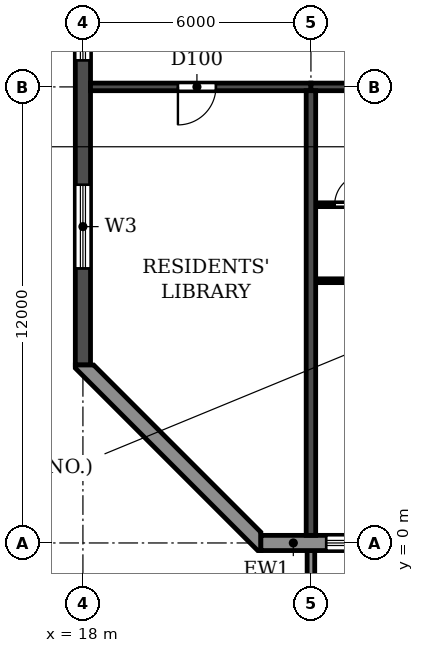
"""IFC4 building model, lengths in metres.
Left out: names, types, materials, properties, quantities, classifications, styles, units other than length and angle.
Written with IfcOpenShell. Run it as: python <this file> out.ifc"""

import sys

from ifc_helpers import new_model, si_unit, direction, frame, frame_2d, origin, place, context, subcontext, project, spatial, polyline, rectangle, outline, extrude, source, transform, mapped, element, fill, save


model = new_model("IFC4")
c1 = context("Model", 3, precision=1e-05, world=origin(), true_north=direction((0.0, 1.0)))
c2 = subcontext(c1, "Body", "Model", "MODEL_VIEW")
j1 = project(units=[si_unit("LENGTHUNIT", "METRE"), si_unit("PLANEANGLEUNIT", "RADIAN")], contexts=[c1])
p1 = place(None, origin())
s1 = spatial("IfcSite", under=j1, at=p1, CompositionType="ELEMENT")
p2 = place(p1, origin())
s2 = spatial("IfcBuilding", under=s1, at=p2, CompositionType="ELEMENT")
p3 = place(p2, frame((0.0, 0.0, 191.7)))
s3 = spatial("IfcBuildingStorey", under=s2, at=p3, CompositionType="ELEMENT", Elevation=191.7)
p4 = place(p3, frame((24.0, 0.2, 0.0), z_axis=(0.0, 0.0, 1.0), x_axis=(0.0, 1.0, 0.0)))
e1 = element("IfcWall", 1, at=p4, inside=s3, PredefinedType="SHEAR", context=c2, shape_type="SweptSolid", body=[
    extrude(rectangle(XDim=11.7, YDim=0.25, at=frame_2d((5.85, 0.0))), origin(), (0.0, 0.0, 1.0), 3.08),
])
p5 = place(p3, frame((18.0, 4.683, 0.0), z_axis=(0.0, 0.0, 1.0), x_axis=(0.0, 1.0, 0.0)))
e2 = element("IfcWall", 2, at=p5, inside=s3, PredefinedType="SHEAR", context=c2, shape_type="SweptSolid", body=[
    extrude(rectangle(XDim=31.834, YDim=0.4, at=frame_2d((15.917, 0.0))), origin(), (0.0, 0.0, 1.0), 3.08),
])
p6 = place(p5, frame((23.817, 0.0, 0.9)))
e3 = element("IfcOpeningElement", 3, at=p6, cuts=e2, PredefinedType="OPENING", context=c2, shape_type="SweptSolid", body=[
    extrude(rectangle(XDim=1.2, YDim=1.5, at=frame_2d((0.6, 0.75))), frame((0.0, 0.21, 0.0), z_axis=(0.0, -1.0, 0.0), x_axis=(1.0, 0.0, 0.0)), (0.0, 0.0, 1.0), 0.42),
])
p7 = place(p5, frame((8.017, 0.0, 0.9)))
e4 = element("IfcOpeningElement", 4, at=p7, cuts=e2, PredefinedType="OPENING", context=c2, shape_type="SweptSolid", body=[
    extrude(rectangle(XDim=1.2, YDim=1.5, at=frame_2d((0.6, 0.75))), frame((0.0, 0.21, 0.0), z_axis=(0.0, -1.0, 0.0), x_axis=(1.0, 0.0, 0.0)), (0.0, 0.0, 1.0), 0.42),
])
p8 = place(p5, frame((27.694, 0.0, 0.6)))
e5 = element("IfcOpeningElement", 5, at=p8, cuts=e2, PredefinedType="OPENING", context=c2, shape_type="SweptSolid", body=[
    extrude(rectangle(XDim=2.2, YDim=1.8, at=frame_2d((1.1, 0.9))), frame((0.0, 0.21, 0.0), z_axis=(0.0, -1.0, 0.0), x_axis=(1.0, 0.0, 0.0)), (0.0, 0.0, 1.0), 0.42),
])
p9 = place(p5, frame((2.541, 0.0, 0.6)))
e6 = element("IfcOpeningElement", 6, at=p9, cuts=e2, PredefinedType="OPENING", context=c2, shape_type="SweptSolid", body=[
    extrude(rectangle(XDim=2.2, YDim=1.8, at=frame_2d((1.1, 0.9))), frame((0.0, 0.21, 0.0), z_axis=(0.0, -1.0, 0.0), x_axis=(1.0, 0.0, 0.0)), (0.0, 0.0, 1.0), 0.42),
])
p10 = place(p5, frame((15.917, 0.0, 0.9)))
e7 = element("IfcOpeningElement", 7, at=p10, cuts=e2, PredefinedType="OPENING", context=c2, shape_type="SweptSolid", body=[
    extrude(rectangle(XDim=1.2, YDim=1.5, at=frame_2d((0.6, 0.75))), frame((0.0, 0.21, 0.0), z_axis=(0.0, -1.0, 0.0), x_axis=(1.0, 0.0, 0.0)), (0.0, 0.0, 1.0), 0.42),
])
p11 = place(p3, frame((18.2, 12.0, 0.0), z_axis=(0.0, 0.0, 1.0), x_axis=(1.0, 0.0, 0.0)))
e8 = element("IfcWall", 8, at=p11, inside=s3, PredefinedType="SHEAR", context=c2, shape_type="SweptSolid", body=[
    extrude(rectangle(XDim=5.8, YDim=0.2, at=frame_2d((2.9, 0.0))), origin(), (0.0, 0.0, 1.0), 2.48),
])
p12 = place(p11, frame((2.3, 0.0, 0.0)))
e9 = element("IfcOpeningElement", 9, at=p12, cuts=e8, PredefinedType="OPENING", context=c2, shape_type="SweptSolid", body=[
    extrude(rectangle(XDim=1.0, YDim=2.1, at=frame_2d((0.5, 1.05))), frame((0.0, 0.11, 0.0), z_axis=(0.0, -1.0, 0.0), x_axis=(1.0, 0.0, 0.0)), (0.0, 0.0, 1.0), 0.22),
])
p13 = place(p3, frame((24.0, 12.0, 0.0), z_axis=(0.0, 0.0, 1.0), x_axis=(1.0, 0.0, 0.0)))
e10 = element("IfcWall", 10, at=p13, inside=s3, PredefinedType="SHEAR", context=c2, shape_type="SweptSolid", body=[
    extrude(rectangle(XDim=6.0, YDim=0.2, at=frame_2d((3.0, 0.0))), origin(), (0.0, 0.0, 1.0), 2.48),
])
p14 = place(p13, frame((2.45, 0.0, 0.0)))
e11 = element("IfcOpeningElement", 11, at=p14, cuts=e10, PredefinedType="OPENING", context=c2, shape_type="SweptSolid", body=[
    extrude(rectangle(XDim=1.0, YDim=2.1, at=frame_2d((0.5, 1.05))), frame((0.0, 0.11, 0.0), z_axis=(0.0, -1.0, 0.0), x_axis=(1.0, 0.0, 0.0)), (0.0, 0.0, 1.0), 0.22),
])
p15 = place(p3, frame((22.683, 0.0, 0.0), z_axis=(0.0, 0.0, 1.0), x_axis=(1.0, 0.0, 0.0)))
e12 = element("IfcWall", 12, at=p15, inside=s3, PredefinedType="STANDARD", context=c2, shape_type="SweptSolid", body=[
    extrude(rectangle(XDim=56.634, YDim=0.4, at=frame_2d((28.317, 0.0))), origin(), (0.0, 0.0, 1.0), 3.08),
])
p16 = place(p15, frame((1.717, 0.0, 0.9)))
e13 = element("IfcOpeningElement", 13, at=p16, cuts=e12, PredefinedType="OPENING", context=c2, shape_type="SweptSolid", body=[
    extrude(rectangle(XDim=2.2, YDim=1.5, at=frame_2d((1.1, 0.75))), frame((0.0, 0.21, 0.0), z_axis=(0.0, -1.0, 0.0), x_axis=(1.0, 0.0, 0.0)), (0.0, 0.0, 1.0), 0.42),
])
p17 = place(p15, frame((4.917, 0.0, 0.0)))
e14 = element("IfcOpeningElement", 14, at=p17, cuts=e12, PredefinedType="OPENING", context=c2, shape_type="SweptSolid", body=[
    extrude(rectangle(XDim=1.8, YDim=2.4, at=frame_2d((0.9, 1.2))), frame((0.0, 0.21, 0.0), z_axis=(0.0, -1.0, 0.0), x_axis=(1.0, 0.0, 0.0)), (0.0, 0.0, 1.0), 0.42),
])
p18 = place(p15, frame((7.717, 0.0, 0.9)))
e15 = element("IfcOpeningElement", 15, at=p18, cuts=e12, PredefinedType="OPENING", context=c2, shape_type="SweptSolid", body=[
    extrude(rectangle(XDim=2.2, YDim=1.5, at=frame_2d((1.1, 0.75))), frame((0.0, 0.21, 0.0), z_axis=(0.0, -1.0, 0.0), x_axis=(1.0, 0.0, 0.0)), (0.0, 0.0, 1.0), 0.42),
])
p19 = place(p15, frame((10.717, 0.0, 0.9)))
e16 = element("IfcOpeningElement", 16, at=p19, cuts=e12, PredefinedType="OPENING", context=c2, shape_type="SweptSolid", body=[
    extrude(rectangle(XDim=2.2, YDim=1.5, at=frame_2d((1.1, 0.75))), frame((0.0, 0.21, 0.0), z_axis=(0.0, -1.0, 0.0), x_axis=(1.0, 0.0, 0.0)), (0.0, 0.0, 1.0), 0.42),
])
p20 = place(p15, frame((13.717, 0.0, 0.9)))
e17 = element("IfcOpeningElement", 17, at=p20, cuts=e12, PredefinedType="OPENING", context=c2, shape_type="SweptSolid", body=[
    extrude(rectangle(XDim=2.2, YDim=1.5, at=frame_2d((1.1, 0.75))), frame((0.0, 0.21, 0.0), z_axis=(0.0, -1.0, 0.0), x_axis=(1.0, 0.0, 0.0)), (0.0, 0.0, 1.0), 0.42),
])
p21 = place(p15, frame((16.917, 0.0, 0.0)))
e18 = element("IfcOpeningElement", 18, at=p21, cuts=e12, PredefinedType="OPENING", context=c2, shape_type="SweptSolid", body=[
    extrude(rectangle(XDim=1.8, YDim=2.4, at=frame_2d((0.9, 1.2))), frame((0.0, 0.21, 0.0), z_axis=(0.0, -1.0, 0.0), x_axis=(1.0, 0.0, 0.0)), (0.0, 0.0, 1.0), 0.42),
])
p22 = place(p15, frame((19.717, 0.0, 0.9)))
e19 = element("IfcOpeningElement", 19, at=p22, cuts=e12, PredefinedType="OPENING", context=c2, shape_type="SweptSolid", body=[
    extrude(rectangle(XDim=2.2, YDim=1.5, at=frame_2d((1.1, 0.75))), frame((0.0, 0.21, 0.0), z_axis=(0.0, -1.0, 0.0), x_axis=(1.0, 0.0, 0.0)), (0.0, 0.0, 1.0), 0.42),
])
p23 = place(p15, frame((22.717, 0.0, 0.9)))
e20 = element("IfcOpeningElement", 20, at=p23, cuts=e12, PredefinedType="OPENING", context=c2, shape_type="SweptSolid", body=[
    extrude(rectangle(XDim=2.2, YDim=1.5, at=frame_2d((1.1, 0.75))), frame((0.0, 0.21, 0.0), z_axis=(0.0, -1.0, 0.0), x_axis=(1.0, 0.0, 0.0)), (0.0, 0.0, 1.0), 0.42),
])
p24 = place(p15, frame((25.917, 0.0, 0.0)))
e21 = element("IfcOpeningElement", 21, at=p24, cuts=e12, PredefinedType="OPENING", context=c2, shape_type="SweptSolid", body=[
    extrude(rectangle(XDim=1.8, YDim=2.4, at=frame_2d((0.9, 1.2))), frame((0.0, 0.21, 0.0), z_axis=(0.0, -1.0, 0.0), x_axis=(1.0, 0.0, 0.0)), (0.0, 0.0, 1.0), 0.42),
])
p25 = place(p15, frame((28.717, 0.0, 0.9)))
e22 = element("IfcOpeningElement", 22, at=p25, cuts=e12, PredefinedType="OPENING", context=c2, shape_type="SweptSolid", body=[
    extrude(rectangle(XDim=2.2, YDim=1.5, at=frame_2d((1.1, 0.75))), frame((0.0, 0.21, 0.0), z_axis=(0.0, -1.0, 0.0), x_axis=(1.0, 0.0, 0.0)), (0.0, 0.0, 1.0), 0.42),
])
p26 = place(p15, frame((31.717, 0.0, 0.9)))
e23 = element("IfcOpeningElement", 23, at=p26, cuts=e12, PredefinedType="OPENING", context=c2, shape_type="SweptSolid", body=[
    extrude(rectangle(XDim=2.2, YDim=1.5, at=frame_2d((1.1, 0.75))), frame((0.0, 0.21, 0.0), z_axis=(0.0, -1.0, 0.0), x_axis=(1.0, 0.0, 0.0)), (0.0, 0.0, 1.0), 0.42),
])
p27 = place(p15, frame((34.717, 0.0, 0.9)))
e24 = element("IfcOpeningElement", 24, at=p27, cuts=e12, PredefinedType="OPENING", context=c2, shape_type="SweptSolid", body=[
    extrude(rectangle(XDim=2.2, YDim=1.5, at=frame_2d((1.1, 0.75))), frame((0.0, 0.21, 0.0), z_axis=(0.0, -1.0, 0.0), x_axis=(1.0, 0.0, 0.0)), (0.0, 0.0, 1.0), 0.42),
])
p28 = place(p15, frame((37.717, 0.0, 0.9)))
e25 = element("IfcOpeningElement", 25, at=p28, cuts=e12, PredefinedType="OPENING", context=c2, shape_type="SweptSolid", body=[
    extrude(rectangle(XDim=2.2, YDim=1.5, at=frame_2d((1.1, 0.75))), frame((0.0, 0.21, 0.0), z_axis=(0.0, -1.0, 0.0), x_axis=(1.0, 0.0, 0.0)), (0.0, 0.0, 1.0), 0.42),
])
p29 = place(p15, frame((40.917, 0.0, 0.0)))
e26 = element("IfcOpeningElement", 26, at=p29, cuts=e12, PredefinedType="OPENING", context=c2, shape_type="SweptSolid", body=[
    extrude(rectangle(XDim=1.8, YDim=2.4, at=frame_2d((0.9, 1.2))), frame((0.0, 0.21, 0.0), z_axis=(0.0, -1.0, 0.0), x_axis=(1.0, 0.0, 0.0)), (0.0, 0.0, 1.0), 0.42),
])
p30 = place(p15, frame((43.717, 0.0, 0.9)))
e27 = element("IfcOpeningElement", 27, at=p30, cuts=e12, PredefinedType="OPENING", context=c2, shape_type="SweptSolid", body=[
    extrude(rectangle(XDim=2.2, YDim=1.5, at=frame_2d((1.1, 0.75))), frame((0.0, 0.21, 0.0), z_axis=(0.0, -1.0, 0.0), x_axis=(1.0, 0.0, 0.0)), (0.0, 0.0, 1.0), 0.42),
])
p31 = place(p15, frame((46.717, 0.0, 0.9)))
e28 = element("IfcOpeningElement", 28, at=p31, cuts=e12, PredefinedType="OPENING", context=c2, shape_type="SweptSolid", body=[
    extrude(rectangle(XDim=2.2, YDim=1.5, at=frame_2d((1.1, 0.75))), frame((0.0, 0.21, 0.0), z_axis=(0.0, -1.0, 0.0), x_axis=(1.0, 0.0, 0.0)), (0.0, 0.0, 1.0), 0.42),
])
p32 = place(p15, frame((49.917, 0.0, 0.0)))
e29 = element("IfcOpeningElement", 29, at=p32, cuts=e12, PredefinedType="OPENING", context=c2, shape_type="SweptSolid", body=[
    extrude(rectangle(XDim=1.8, YDim=2.4, at=frame_2d((0.9, 1.2))), frame((0.0, 0.21, 0.0), z_axis=(0.0, -1.0, 0.0), x_axis=(1.0, 0.0, 0.0)), (0.0, 0.0, 1.0), 0.42),
])
p33 = place(p15, frame((52.717, 0.0, 0.9)))
e30 = element("IfcOpeningElement", 30, at=p33, cuts=e12, PredefinedType="OPENING", context=c2, shape_type="SweptSolid", body=[
    extrude(rectangle(XDim=2.2, YDim=1.5, at=frame_2d((1.1, 0.75))), frame((0.0, 0.21, 0.0), z_axis=(0.0, -1.0, 0.0), x_axis=(1.0, 0.0, 0.0)), (0.0, 0.0, 1.0), 0.42),
])
p34 = place(p3, origin())
e31 = element("IfcWall", 31, at=p34, inside=s3, PredefinedType="STANDARD", context=c2, shape_type="SweptSolid", body=[
    extrude(outline(polyline([(17.8, 4.683), (17.8, 4.6), (22.6, -0.2), (22.683, -0.2), (22.683, 0.283), (18.283, 4.683), (17.8, 4.683)])), origin(), (0.0, 0.0, 1.0), 3.08),
])
m1 = source(origin(), c2, "Body", "SweptSolid", [
    extrude(outline(polyline([(0.0, 0.0), (0.2, 0.0), (0.2, 1.65), (0.0, 1.65), (0.0, 0.0)])), origin(), (0.0, 0.0, 1.0), 3.1),
])
p35 = place(p3, frame((23.9, -1.85, 0.0)))
e32 = element("IfcWall", 32, at=p35, inside=s3, PredefinedType="STANDARD", context=c2, shape_type="MappedRepresentation", body=[
    mapped(m1, transform((0.0, 0.0, 0.0))),
])
p36 = place(p3, frame((24.135, 6.9, 0.0), z_axis=(0.0, 0.0, 1.0), x_axis=(1.0, 0.0, 0.0)))
e33 = element("IfcWall", 33, at=p36, inside=s3, PredefinedType="PARTITIONING", context=c2, shape_type="SweptSolid", body=[
    extrude(rectangle(XDim=2.915, YDim=0.1, at=frame_2d((1.458, 0.0))), origin(), (0.0, 0.0, 1.0), 3.08),
])
p37 = place(p36, frame((1.465, 0.0, 0.0)))
e34 = element("IfcOpeningElement", 34, at=p37, cuts=e33, PredefinedType="OPENING", context=c2, shape_type="SweptSolid", body=[
    extrude(rectangle(XDim=0.9, YDim=2.1, at=frame_2d((0.45, 1.05))), frame((0.0, 0.06, 0.0), z_axis=(0.0, -1.0, 0.0), x_axis=(1.0, 0.0, 0.0)), (0.0, 0.0, 1.0), 0.12),
])
p38 = place(p3, frame((24.135, 8.9, 0.0), z_axis=(0.0, 0.0, 1.0), x_axis=(1.0, 0.0, 0.0)))
e35 = element("IfcWall", 35, at=p38, inside=s3, PredefinedType="PARTITIONING", context=c2, shape_type="SweptSolid", body=[
    extrude(rectangle(XDim=1.965, YDim=0.1, at=frame_2d((0.982, 0.0))), origin(), (0.0, 0.0, 1.0), 3.08),
])
p39 = place(p38, frame((0.49, 0.0, 0.0)))
e36 = element("IfcOpeningElement", 36, at=p39, cuts=e35, PredefinedType="OPENING", context=c2, shape_type="SweptSolid", body=[
    extrude(rectangle(XDim=0.8, YDim=2.1, at=frame_2d((0.4, 1.05))), frame((0.0, 0.06, 0.0), z_axis=(0.0, -1.0, 0.0), x_axis=(1.0, 0.0, 0.0)), (0.0, 0.0, 1.0), 0.12),
])
p40 = place(p16, origin())
e37 = element("IfcWindow", 37, at=p40, inside=s3, PartitioningType="DOUBLE_PANEL_HORIZONTAL", PredefinedType="WINDOW", context=c2, shape_type="SweptSolid", body=[
    extrude(rectangle(XDim=2.2, YDim=1.5, at=frame_2d((1.1, 0.75))), frame((0.0, 0.03, 0.0), z_axis=(0.0, -1.0, 0.0), x_axis=(1.0, 0.0, 0.0)), (0.0, 0.0, 1.0), 0.06),
])
fill(e13, e37)
p41 = place(p7, origin())
e38 = element("IfcWindow", 38, at=p41, inside=s3, PartitioningType="SINGLE_PANEL", PredefinedType="WINDOW", context=c2, shape_type="SweptSolid", body=[
    extrude(rectangle(XDim=1.2, YDim=1.5, at=frame_2d((0.6, 0.75))), frame((0.0, 0.03, 0.0), z_axis=(0.0, -1.0, 0.0), x_axis=(1.0, 0.0, 0.0)), (0.0, 0.0, 1.0), 0.06),
])
fill(e4, e38)
p42 = place(p9, origin())
e39 = element("IfcWindow", 39, at=p42, inside=s3, PartitioningType="DOUBLE_PANEL_HORIZONTAL", PredefinedType="WINDOW", context=c2, shape_type="SweptSolid", body=[
    extrude(rectangle(XDim=2.2, YDim=1.8, at=frame_2d((1.1, 0.9))), frame((0.0, 0.03, 0.0), z_axis=(0.0, -1.0, 0.0), x_axis=(1.0, 0.0, 0.0)), (0.0, 0.0, 1.0), 0.06),
])
fill(e6, e39)
p43 = place(p12, frame((1.0, 0.0, 0.0), z_axis=(0.0, 0.0, 1.0), x_axis=(-1.0, 0.0, 0.0)))
e40 = element("IfcDoor", 40, at=p43, inside=s3, OperationType="SINGLE_SWING_RIGHT", PredefinedType="DOOR", context=c2, shape_type="SweptSolid", body=[
    extrude(rectangle(XDim=1.0, YDim=2.1, at=frame_2d((0.5, 1.05))), frame((0.0, 0.025, 0.0), z_axis=(0.0, -1.0, 0.0), x_axis=(1.0, 0.0, 0.0)), (0.0, 0.0, 1.0), 0.05),
])
fill(e9, e40)
p44 = place(p39, origin())
e41 = element("IfcDoor", 41, at=p44, inside=s3, OperationType="SINGLE_SWING_RIGHT", PredefinedType="DOOR", context=c2, shape_type="SweptSolid", body=[
    extrude(rectangle(XDim=0.8, YDim=2.1, at=frame_2d((0.4, 1.05))), frame((0.0, 0.025, 0.0), z_axis=(0.0, -1.0, 0.0), x_axis=(1.0, 0.0, 0.0)), (0.0, 0.0, 1.0), 0.05),
])
fill(e36, e41)
save(model, sys.argv[1])
